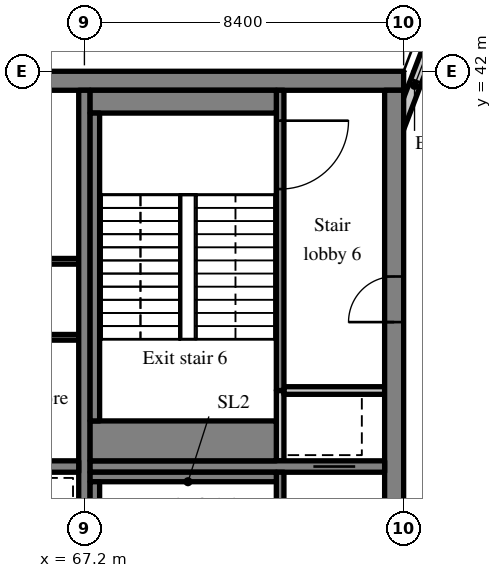
"""IFC4 building model, lengths in metres.
Left out: names, types, materials, properties, quantities, classifications, styles, units other than length and angle.
Written with IfcOpenShell. Run it as: python <this file> out.ifc"""

import sys

from ifc_helpers import new_model, si_unit, direction, frame, frame_2d, origin, place, context, subcontext, project, spatial, rectangle, extrude, source, transform, mapped, element, fill, save


model = new_model("IFC4")
c1 = context("Model", 3, precision=1e-05, world=origin(), true_north=direction((0.0, 1.0)))
c2 = subcontext(c1, "Body", "Model", "MODEL_VIEW")
j1 = project(units=[si_unit("LENGTHUNIT", "METRE"), si_unit("PLANEANGLEUNIT", "RADIAN")], contexts=[c1])
p1 = place(None, origin())
s1 = spatial("IfcSite", under=j1, at=p1, CompositionType="ELEMENT")
p2 = place(p1, origin())
s2 = spatial("IfcBuilding", under=s1, at=p2, CompositionType="ELEMENT")
p3 = place(p2, frame((0.0, 0.0, 293.7)))
s3 = spatial("IfcBuildingStorey", under=s2, at=p3, CompositionType="ELEMENT", Elevation=293.7)
m1 = source(origin(), c2, "Body", "SweptSolid", [
    extrude(rectangle(XDim=50.4, YDim=0.5, at=frame_2d((25.2, 0.0))), origin(), (0.0, 0.0, 1.0), 3.72),
])
p4 = place(p3, frame((25.2, 41.75, 0.0), z_axis=(0.0, 0.0, 1.0), x_axis=(1.0, 0.0, 0.0)))
e1 = element("IfcWall", 1, at=p4, inside=s3, PredefinedType="SHEAR", context=c2, shape_type="MappedRepresentation", body=[
    mapped(m1, transform((0.0, 0.0, 0.0), scale=1.0)),
])
m2 = source(origin(), c2, "Body", "SweptSolid", [
    extrude(rectangle(XDim=19.0, YDim=0.5, at=frame_2d((9.5, 0.0))), origin(), (0.0, 0.0, 1.0), 3.72),
])
p5 = place(p3, frame((75.35, 22.5, 0.0), z_axis=(0.0, 0.0, 1.0), x_axis=(0.0, 1.0, 0.0)))
e2 = element("IfcWall", 2, at=p5, inside=s3, PredefinedType="SHEAR", context=c2, shape_type="MappedRepresentation", body=[
    mapped(m2, transform((0.0, 0.0, 0.0), scale=1.0)),
])
m3 = source(origin(), c2, "Body", "SweptSolid", [
    extrude(rectangle(XDim=1.2, YDim=2.1, at=frame_2d((0.6, 1.05))), frame((0.0, 0.26, 0.0), z_axis=(0.0, -1.0, 0.0), x_axis=(1.0, 0.0, 0.0)), (0.0, 0.0, 1.0), 0.52),
])
p6 = place(p5, frame((12.9, 0.0, 0.0)))
e3 = element("IfcOpeningElement", 3, at=p6, cuts=e2, PredefinedType="OPENING", context=c2, shape_type="MappedRepresentation", body=[
    mapped(m3, transform((0.0, 0.0, 0.0), scale=1.0)),
])
m4 = source(origin(), c2, "Body", "SweptSolid", [
    extrude(rectangle(XDim=19.0, YDim=0.3, at=frame_2d((9.5, 0.0))), origin(), (0.0, 0.0, 1.0), 3.72),
])
p7 = place(p3, frame((67.2, 22.5, 0.0), z_axis=(0.0, 0.0, 1.0), x_axis=(0.0, 1.0, 0.0)))
e4 = element("IfcWall", 4, at=p7, inside=s3, PredefinedType="SHEAR", context=c2, shape_type="MappedRepresentation", body=[
    mapped(m4, transform((0.0, 0.0, 0.0), scale=1.0)),
])
m5 = source(origin(), c2, "Body", "SweptSolid", [
    extrude(rectangle(XDim=16.5, YDim=0.3, at=frame_2d((8.25, 0.0))), origin(), (0.0, 0.0, 1.0), 3.72),
])
p8 = place(p3, frame((50.55, 31.6, 0.0), z_axis=(0.0, 0.0, 1.0), x_axis=(1.0, 0.0, 0.0)))
e5 = element("IfcWall", 5, at=p8, inside=s3, PredefinedType="SHEAR", context=c2, shape_type="MappedRepresentation", body=[
    mapped(m5, transform((0.0, 0.0, 0.0), scale=1.0)),
])
m6 = source(origin(), c2, "Body", "SweptSolid", [
    extrude(rectangle(XDim=1.0, YDim=2.1, at=frame_2d((0.5, 1.05))), frame((0.0, 0.16, 0.0), z_axis=(0.0, -1.0, 0.0), x_axis=(1.0, 0.0, 0.0)), (0.0, 0.0, 1.0), 0.32),
])
p9 = place(p8, frame((0.625, 0.0, 0.0)))
e6 = element("IfcOpeningElement", 6, at=p9, cuts=e5, PredefinedType="OPENING", context=c2, shape_type="MappedRepresentation", body=[
    mapped(m6, transform((0.0, 0.0, 0.0), scale=1.0)),
])
m7 = source(origin(), c2, "Body", "SweptSolid", [
    extrude(rectangle(XDim=7.75, YDim=0.3, at=frame_2d((3.875, 0.0))), origin(), (0.0, 0.0, 1.0), 3.72),
])
p10 = place(p3, frame((67.35, 31.6, 0.0), z_axis=(0.0, 0.0, 1.0), x_axis=(1.0, 0.0, 0.0)))
e7 = element("IfcWall", 7, at=p10, inside=s3, PredefinedType="SHEAR", context=c2, shape_type="MappedRepresentation", body=[
    mapped(m7, transform((0.0, 0.0, 0.0), scale=1.0)),
])
m8 = source(origin(), c2, "Body", "SweptSolid", [
    extrude(rectangle(XDim=1.1, YDim=2.1, at=frame_2d((0.55, 1.05))), frame((0.0, 0.16, 0.0), z_axis=(0.0, -1.0, 0.0), x_axis=(1.0, 0.0, 0.0)), (0.0, 0.0, 1.0), 0.32),
])
p11 = place(p10, frame((5.875, 0.0, 0.0)))
e8 = element("IfcOpeningElement", 8, at=p11, cuts=e7, PredefinedType="OPENING", context=c2, shape_type="MappedRepresentation", body=[
    mapped(m8, transform((0.0, 0.0, 0.0), scale=1.0)),
])
m9 = source(origin(), c2, "Body", "SweptSolid", [
    extrude(rectangle(XDim=3.559, YDim=0.3, at=frame_2d((1.78, 0.0))), origin(), (0.0, 0.0, 1.0), 3.72),
])
p12 = place(p3, frame((76.523, 43.292, 0.0), z_axis=(0.0, 0.0, 1.0), x_axis=(-0.35779745313, -0.933799219604, 0.0)))
e9 = element("IfcWall", 9, at=p12, inside=s3, PredefinedType="SOLIDWALL", context=c2, shape_type="MappedRepresentation", body=[
    mapped(m9, transform((0.0, 0.0, 0.0), scale=1.0)),
])
m10 = source(origin(), c2, "Body", "SweptSolid", [
    extrude(rectangle(XDim=1.5, YDim=2.0, at=frame_2d((0.75, 1.0))), frame((0.0, 0.16, 0.0), z_axis=(0.0, -1.0, 0.0), x_axis=(1.0, 0.0, 0.0)), (0.0, 0.0, 1.0), 0.32),
])
p13 = place(p12, frame((0.156, 0.0, 0.9)))
e10 = element("IfcOpeningElement", 10, at=p13, cuts=e9, PredefinedType="OPENING", context=c2, shape_type="MappedRepresentation", body=[
    mapped(m10, transform((0.0, 0.0, 0.0), scale=1.0)),
])
m11 = source(origin(), c2, "Body", "SweptSolid", [
    extrude(rectangle(XDim=14.25, YDim=0.15, at=frame_2d((7.125, 0.0))), origin(), (0.0, 0.0, 1.0), 3.72),
])
p14 = place(p3, frame((67.05, 35.0, 0.0), z_axis=(0.0, 0.0, 1.0), x_axis=(-1.0, 0.0, 0.0)))
e11 = element("IfcWall", 11, at=p14, inside=s3, PredefinedType="PARTITIONING", context=c2, shape_type="MappedRepresentation", body=[
    mapped(m11, transform((0.0, 0.0, 0.0), scale=1.0)),
])
m12 = source(origin(), c2, "Body", "SweptSolid", [
    extrude(rectangle(XDim=0.9, YDim=2.1, at=frame_2d((0.45, 1.05))), frame((0.0, 0.085, 0.0), z_axis=(0.0, -1.0, 0.0), x_axis=(1.0, 0.0, 0.0)), (0.0, 0.0, 1.0), 0.17),
])
p15 = place(p14, frame((0.968, 0.0, 0.0)))
e12 = element("IfcOpeningElement", 12, at=p15, cuts=e11, PredefinedType="OPENING", context=c2, shape_type="MappedRepresentation", body=[
    mapped(m12, transform((0.0, 0.0, 0.0), scale=1.0)),
])
p16 = place(p14, frame((5.929, 0.0, 0.0)))
e13 = element("IfcOpeningElement", 13, at=p16, cuts=e11, PredefinedType="OPENING", context=c2, shape_type="MappedRepresentation", body=[
    mapped(m12, transform((0.0, 0.0, 0.0), scale=1.0)),
])
p17 = place(p14, frame((11.599, 0.0, 0.0)))
e14 = element("IfcOpeningElement", 14, at=p17, cuts=e11, PredefinedType="OPENING", context=c2, shape_type="MappedRepresentation", body=[
    mapped(m12, transform((0.0, 0.0, 0.0), scale=1.0)),
])
m13 = source(origin(), c2, "Body", "SweptSolid", [
    extrude(rectangle(XDim=16.5, YDim=0.15, at=frame_2d((8.25, 0.0))), origin(), (0.0, 0.0, 1.0), 3.72),
])
p18 = place(p3, frame((67.05, 37.0, 0.0), z_axis=(0.0, 0.0, 1.0), x_axis=(-1.0, 0.0, 0.0)))
e15 = element("IfcWall", 15, at=p18, inside=s3, PredefinedType="PARTITIONING", context=c2, shape_type="MappedRepresentation", body=[
    mapped(m13, transform((0.0, 0.0, 0.0), scale=1.0)),
])
p19 = place(p18, frame((0.788, 0.0, 0.0)))
e16 = element("IfcOpeningElement", 16, at=p19, cuts=e15, PredefinedType="OPENING", context=c2, shape_type="MappedRepresentation", body=[
    mapped(m12, transform((0.0, 0.0, 0.0), scale=1.0)),
])
p20 = place(p18, frame((3.675, 0.0, 0.0)))
e17 = element("IfcOpeningElement", 17, at=p20, cuts=e15, PredefinedType="OPENING", context=c2, shape_type="MappedRepresentation", body=[
    mapped(m12, transform((0.0, 0.0, 0.0), scale=1.0)),
])
p21 = place(p18, frame((9.45, 0.0, 0.0)))
e18 = element("IfcOpeningElement", 18, at=p21, cuts=e15, PredefinedType="OPENING", context=c2, shape_type="MappedRepresentation", body=[
    mapped(m12, transform((0.0, 0.0, 0.0), scale=1.0)),
])
p22 = place(p18, frame((14.813, 0.0, 0.0)))
e19 = element("IfcOpeningElement", 19, at=p22, cuts=e15, PredefinedType="OPENING", context=c2, shape_type="MappedRepresentation", body=[
    mapped(m12, transform((0.0, 0.0, 0.0), scale=1.0)),
])
m14 = source(origin(), c2, "Body", "SweptSolid", [
    extrude(rectangle(XDim=8.95, YDim=0.2, at=frame_2d((4.475, 0.0))), origin(), (0.0, 0.0, 1.0), 3.72),
])
p23 = place(p3, frame((72.35, 22.5, 0.0), z_axis=(0.0, 0.0, 1.0), x_axis=(0.0, 1.0, 0.0)))
e20 = element("IfcWall", 20, at=p23, inside=s3, PredefinedType="SOLIDWALL", context=c2, shape_type="MappedRepresentation", body=[
    mapped(m14, transform((0.0, 0.0, 0.0), scale=1.0)),
])
m15 = source(origin(), c2, "Body", "SweptSolid", [
    extrude(rectangle(XDim=1.2, YDim=2.1, at=frame_2d((0.6, 1.05))), frame((0.0, 0.11, 0.0), z_axis=(0.0, -1.0, 0.0), x_axis=(1.0, 0.0, 0.0)), (0.0, 0.0, 1.0), 0.22),
])
p24 = place(p23, frame((7.0, 0.0, 0.0)))
e21 = element("IfcOpeningElement", 21, at=p24, cuts=e20, PredefinedType="OPENING", context=c2, shape_type="MappedRepresentation", body=[
    mapped(m15, transform((0.0, 0.0, 0.0), scale=1.0)),
])
m16 = source(origin(), c2, "Body", "SweptSolid", [
    extrude(rectangle(XDim=1.85, YDim=0.2, at=frame_2d((0.925, 0.0))), origin(), (0.0, 0.0, 1.0), 3.72),
])
p25 = place(p3, frame((72.35, 31.75, 0.0), z_axis=(0.0, 0.0, 1.0), x_axis=(0.0, 1.0, 0.0)))
e22 = element("IfcWall", 22, at=p25, inside=s3, PredefinedType="SOLIDWALL", context=c2, shape_type="MappedRepresentation", body=[
    mapped(m16, transform((0.0, 0.0, 0.0), scale=1.0)),
])
m17 = source(origin(), c2, "Body", "SweptSolid", [
    extrude(rectangle(XDim=2.65, YDim=0.2, at=frame_2d((1.325, 0.0))), origin(), (0.0, 0.0, 1.0), 3.72),
])
p26 = place(p3, frame((72.45, 33.6, 0.0), z_axis=(0.0, 0.0, 1.0), x_axis=(1.0, 0.0, 0.0)))
e23 = element("IfcWall", 23, at=p26, inside=s3, PredefinedType="SOLIDWALL", context=c2, shape_type="MappedRepresentation", body=[
    mapped(m17, transform((0.0, 0.0, 0.0), scale=1.0)),
])
m18 = source(origin(), c2, "Body", "SweptSolid", [
    extrude(rectangle(XDim=7.9, YDim=0.2, at=frame_2d((3.95, 0.0))), origin(), (0.0, 0.0, 1.0), 3.72),
])
p27 = place(p3, frame((72.35, 33.6, 0.0), z_axis=(0.0, 0.0, 1.0), x_axis=(0.0, 1.0, 0.0)))
e24 = element("IfcWall", 24, at=p27, inside=s3, PredefinedType="SOLIDWALL", context=c2, shape_type="MappedRepresentation", body=[
    mapped(m18, transform((0.0, 0.0, 0.0), scale=1.0)),
])
m19 = source(origin(), c2, "Body", "SweptSolid", [
    extrude(rectangle(XDim=1.8, YDim=2.1, at=frame_2d((0.9, 1.05))), frame((0.0, 0.11, 0.0), z_axis=(0.0, -1.0, 0.0), x_axis=(1.0, 0.0, 0.0)), (0.0, 0.0, 1.0), 0.22),
])
p28 = place(p27, frame((5.3, 0.0, 0.0)))
e25 = element("IfcOpeningElement", 25, at=p28, cuts=e24, PredefinedType="OPENING", context=c2, shape_type="MappedRepresentation", body=[
    mapped(m19, transform((0.0, 0.0, 0.0), scale=1.0)),
])
m20 = source(origin(), c2, "Body", "SweptSolid", [
    extrude(rectangle(XDim=4.9, YDim=0.25, at=frame_2d((2.45, 0.0))), origin(), (0.0, 0.0, 1.0), 3.72),
])
p29 = place(p3, frame((67.35, 31.325, 0.0), z_axis=(0.0, 0.0, 1.0), x_axis=(1.0, 0.0, 0.0)))
e26 = element("IfcWall", 26, at=p29, inside=s3, PredefinedType="SOLIDWALL", context=c2, shape_type="MappedRepresentation", body=[
    mapped(m20, transform((0.0, 0.0, 0.0), scale=1.0)),
])
m21 = source(origin(), c2, "Body", "SweptSolid", [
    extrude(rectangle(XDim=8.1, YDim=0.25, at=frame_2d((4.05, 0.0))), origin(), (0.0, 0.0, 1.0), 3.72),
])
p30 = place(p3, frame((67.475, 23.1, 0.0), z_axis=(0.0, 0.0, 1.0), x_axis=(0.0, 1.0, 0.0)))
e27 = element("IfcWall", 27, at=p30, inside=s3, PredefinedType="SOLIDWALL", context=c2, shape_type="MappedRepresentation", body=[
    mapped(m21, transform((0.0, 0.0, 0.0), scale=1.0)),
])
m22 = source(origin(), c2, "Body", "SweptSolid", [
    extrude(rectangle(XDim=4.9, YDim=0.6, at=frame_2d((2.45, 0.0))), origin(), (0.0, 0.0, 1.0), 3.72),
])
p31 = place(p3, frame((67.35, 41.2, 0.0), z_axis=(0.0, 0.0, 1.0), x_axis=(1.0, 0.0, 0.0)))
e28 = element("IfcWall", 28, at=p31, inside=s3, PredefinedType="SOLIDWALL", context=c2, shape_type="MappedRepresentation", body=[
    mapped(m22, transform((0.0, 0.0, 0.0), scale=1.0)),
])
m23 = source(origin(), c2, "Body", "SweptSolid", [
    extrude(rectangle(XDim=4.9, YDim=1.05, at=frame_2d((2.45, 0.0))), origin(), (0.0, 0.0, 1.0), 3.72),
])
p32 = place(p3, frame((67.35, 32.275, 0.0), z_axis=(0.0, 0.0, 1.0), x_axis=(1.0, 0.0, 0.0)))
e29 = element("IfcWall", 29, at=p32, inside=s3, PredefinedType="SOLIDWALL", context=c2, shape_type="MappedRepresentation", body=[
    mapped(m23, transform((0.0, 0.0, 0.0), scale=1.0)),
])
p33 = place(p3, frame((67.475, 32.8, 0.0), z_axis=(0.0, 0.0, 1.0), x_axis=(0.0, 1.0, 0.0)))
e30 = element("IfcWall", 30, at=p33, inside=s3, PredefinedType="SOLIDWALL", context=c2, shape_type="MappedRepresentation", body=[
    mapped(m21, transform((0.0, 0.0, 0.0), scale=1.0)),
])
m24 = source(origin(), c2, "Body", "SweptSolid", [
    extrude(rectangle(XDim=1.5, YDim=2.0, at=frame_2d((0.75, 1.0))), frame((0.0, 0.03, 0.0), z_axis=(0.0, -1.0, 0.0), x_axis=(1.0, 0.0, 0.0)), (0.0, 0.0, 1.0), 0.06),
])
p34 = place(p13, origin())
e31 = element("IfcWindow", 31, at=p34, inside=s3, PartitioningType="SINGLE_PANEL", PredefinedType="WINDOW", context=c2, shape_type="MappedRepresentation", body=[
    mapped(m24, transform((0.0, 0.0, 0.0), scale=1.0)),
])
fill(e10, e31)
m25 = source(origin(), c2, "Body", "SweptSolid", [
    extrude(rectangle(XDim=1.1, YDim=2.1, at=frame_2d((0.55, 1.05))), frame((0.0, 0.025, 0.0), z_axis=(0.0, -1.0, 0.0), x_axis=(1.0, 0.0, 0.0)), (0.0, 0.0, 1.0), 0.05),
])
p35 = place(p11, origin())
e32 = element("IfcDoor", 32, at=p35, inside=s3, OperationType="SLIDING_TO_LEFT", PredefinedType="DOOR", context=c2, shape_type="MappedRepresentation", body=[
    mapped(m25, transform((0.0, 0.0, 0.0), scale=1.0)),
])
fill(e8, e32)
m26 = source(origin(), c2, "Body", "SweptSolid", [
    extrude(rectangle(XDim=1.8, YDim=2.1, at=frame_2d((0.9, 1.05))), frame((0.0, 0.025, 0.0), z_axis=(0.0, -1.0, 0.0), x_axis=(1.0, 0.0, 0.0)), (0.0, 0.0, 1.0), 0.05),
])
p36 = place(p28, origin())
e33 = element("IfcDoor", 33, at=p36, inside=s3, OperationType="SINGLE_SWING_RIGHT", PredefinedType="DOOR", context=c2, shape_type="MappedRepresentation", body=[
    mapped(m26, transform((0.0, 0.0, 0.0), scale=1.0)),
])
fill(e25, e33)
m27 = source(origin(), c2, "Body", "SweptSolid", [
    extrude(rectangle(XDim=1.2, YDim=2.1, at=frame_2d((0.6, 1.05))), frame((0.0, 0.025, 0.0), z_axis=(0.0, -1.0, 0.0), x_axis=(1.0, 0.0, 0.0)), (0.0, 0.0, 1.0), 0.05),
])
p37 = place(p6, origin())
e34 = element("IfcDoor", 34, at=p37, inside=s3, OperationType="SINGLE_SWING_LEFT", PredefinedType="DOOR", context=c2, shape_type="MappedRepresentation", body=[
    mapped(m27, transform((0.0, 0.0, 0.0), scale=1.0)),
])
fill(e3, e34)
save(model, sys.argv[1])
